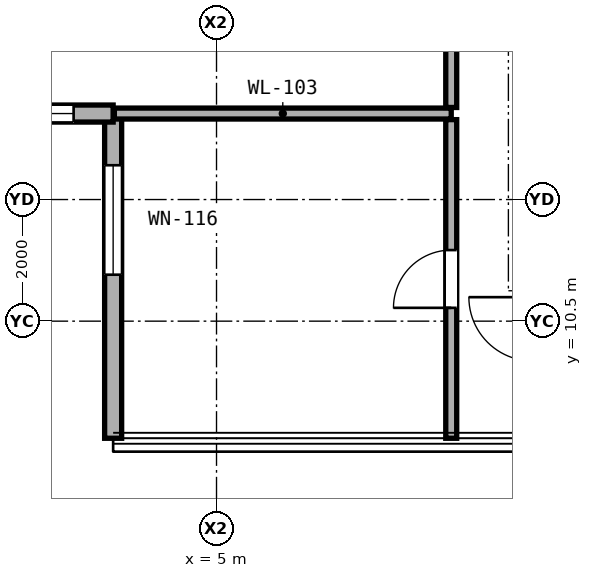
"""IFC4 building model, lengths in metres.
Left out: names, types, materials, properties, quantities, classifications, styles, units other than length and angle.
Written with IfcOpenShell. Run it as: python <this file> out.ifc"""

import sys

from ifc_helpers import new_model, si_unit, direction, frame, frame_2d, origin, place, context, subcontext, project, spatial, rectangle, extrude, element, fill, save


model = new_model("IFC4")
c1 = context("Model", 3, precision=1e-05, world=origin(), true_north=direction((0.0, 1.0)))
c2 = subcontext(c1, "Body", "Model", "MODEL_VIEW")
j1 = project(units=[si_unit("LENGTHUNIT", "METRE"), si_unit("PLANEANGLEUNIT", "RADIAN")], contexts=[c1])
p1 = place(None, origin())
s1 = spatial("IfcSite", under=j1, at=p1, CompositionType="ELEMENT")
p2 = place(p1, origin())
s2 = spatial("IfcBuilding", under=s1, at=p2, CompositionType="ELEMENT")
p3 = place(p2, frame((0.0, 0.0, 75.2)))
s3 = spatial("IfcBuildingStorey", under=s2, at=p3, CompositionType="ELEMENT", Elevation=75.2)
p4 = place(p3, frame((3.3, 13.914, 0.0), z_axis=(0.0, 0.0, 1.0), x_axis=(0.0, -1.0, 0.0)))
e1 = element("IfcWall", 1, at=p4, inside=s3, PredefinedType="SOLIDWALL", context=c2, shape_type="SweptSolid", body=[
    extrude(rectangle(XDim=5.34, YDim=0.28, at=frame_2d((2.67, 0.0))), origin(), (0.0, 0.0, 1.0), 3.04),
])
p5 = place(p4, frame((0.85, 0.0, 0.79)))
e2 = element("IfcOpeningElement", 2, at=p5, cuts=e1, PredefinedType="OPENING", context=c2, shape_type="SweptSolid", body=[
    extrude(rectangle(XDim=1.8, YDim=2.1, at=frame_2d((0.9, 1.05))), frame((0.0, 0.15, 0.0), z_axis=(0.0, -1.0, 0.0), x_axis=(1.0, 0.0, 0.0)), (0.0, 0.0, 1.0), 0.3),
])
p6 = place(p3, frame((-2.04, 13.914, 0.0), z_axis=(0.0, 0.0, 1.0), x_axis=(1.0, 0.0, 0.0)))
e3 = element("IfcWall", 3, at=p6, inside=s3, PredefinedType="SOLIDWALL", context=c2, shape_type="SweptSolid", body=[
    extrude(rectangle(XDim=5.34, YDim=0.28, at=frame_2d((2.67, 0.0))), origin(), (0.0, 0.0, 1.0), 3.04),
])
p7 = place(p6, frame((3.59, 0.0, 0.85)))
e4 = element("IfcOpeningElement", 4, at=p7, cuts=e3, PredefinedType="OPENING", context=c2, shape_type="SweptSolid", body=[
    extrude(rectangle(XDim=1.1, YDim=2.0, at=frame_2d((0.55, 1.0))), frame((0.0, 0.15, 0.0), z_axis=(0.0, -1.0, 0.0), x_axis=(1.0, 0.0, 0.0)), (0.0, 0.0, 1.0), 0.3),
])
p8 = place(p3, frame((3.32, 13.914, 0.0), z_axis=(0.0, 0.0, 1.0), x_axis=(1.0, 0.0, 0.0)))
e5 = element("IfcWall", 5, at=p8, inside=s3, PredefinedType="PARTITIONING", context=c2, shape_type="SweptSolid", body=[
    extrude(rectangle(XDim=5.54, YDim=0.18, at=frame_2d((2.77, 0.0))), origin(), (0.0, 0.0, 1.0), 3.06),
])
p9 = place(p3, frame((8.86, 8.574, 0.0), z_axis=(0.0, 0.0, 1.0), x_axis=(0.0, 1.0, 0.0)))
e6 = element("IfcWall", 6, at=p9, inside=s3, PredefinedType="PARTITIONING", context=c2, shape_type="SweptSolid", body=[
    extrude(rectangle(XDim=5.24, YDim=0.18, at=frame_2d((2.62, 0.0))), origin(), (0.0, 0.0, 1.0), 3.06),
])
p10 = place(p9, frame((2.145, 0.0, 0.0)))
e7 = element("IfcOpeningElement", 7, at=p10, cuts=e6, PredefinedType="OPENING", context=c2, shape_type="SweptSolid", body=[
    extrude(rectangle(XDim=0.95, YDim=2.15, at=frame_2d((0.475, 1.075))), frame((0.0, 0.1, 0.0), z_axis=(0.0, -1.0, 0.0), x_axis=(1.0, 0.0, 0.0)), (0.0, 0.0, 1.0), 0.2),
])
p11 = place(p3, frame((8.86, 14.014, 0.0), z_axis=(0.0, 0.0, 1.0), x_axis=(0.0, 1.0, 0.0)))
e8 = element("IfcWall", 8, at=p11, inside=s3, PredefinedType="PARTITIONING", context=c2, shape_type="SweptSolid", body=[
    extrude(rectangle(XDim=12.977, YDim=0.18, at=frame_2d((6.489, 0.0))), origin(), (0.0, 0.0, 1.0), 2.279),
])
p12 = place(p11, frame((5.963, 0.0, 0.0)))
e9 = element("IfcOpeningElement", 9, at=p12, cuts=e8, PredefinedType="OPENING", context=c2, shape_type="SweptSolid", body=[
    extrude(rectangle(XDim=1.05, YDim=2.2, at=frame_2d((0.525, 1.1))), frame((0.0, 0.1, 0.0), z_axis=(0.0, -1.0, 0.0), x_axis=(1.0, 0.0, 0.0)), (0.0, 0.0, 1.0), 0.2),
])
p13 = place(p5, origin())
e10 = element("IfcWindow", 10, at=p13, inside=s3, PartitioningType="SINGLE_PANEL", PredefinedType="WINDOW", context=c2, shape_type="SweptSolid", body=[
    extrude(rectangle(XDim=1.8, YDim=2.1, at=frame_2d((0.9, 1.05))), frame((0.0, 0.03, 0.0), z_axis=(0.0, -1.0, 0.0), x_axis=(1.0, 0.0, 0.0)), (0.0, 0.0, 1.0), 0.06),
])
fill(e2, e10)
p14 = place(p7, origin())
e11 = element("IfcWindow", 11, at=p14, inside=s3, PartitioningType="SINGLE_PANEL", PredefinedType="WINDOW", context=c2, shape_type="SweptSolid", body=[
    extrude(rectangle(XDim=1.1, YDim=2.0, at=frame_2d((0.55, 1.0))), frame((0.0, 0.03, 0.0), z_axis=(0.0, -1.0, 0.0), x_axis=(1.0, 0.0, 0.0)), (0.0, 0.0, 1.0), 0.06),
])
fill(e4, e11)
p15 = place(p10, origin())
e12 = element("IfcDoor", 12, at=p15, inside=s3, OperationType="SINGLE_SWING_LEFT", PredefinedType="DOOR", context=c2, shape_type="SweptSolid", body=[
    extrude(rectangle(XDim=0.95, YDim=2.15, at=frame_2d((0.475, 1.075))), frame((0.0, 0.025, 0.0), z_axis=(0.0, -1.0, 0.0), x_axis=(1.0, 0.0, 0.0)), (0.0, 0.0, 1.0), 0.05),
])
fill(e7, e12)
save(model, sys.argv[1])
